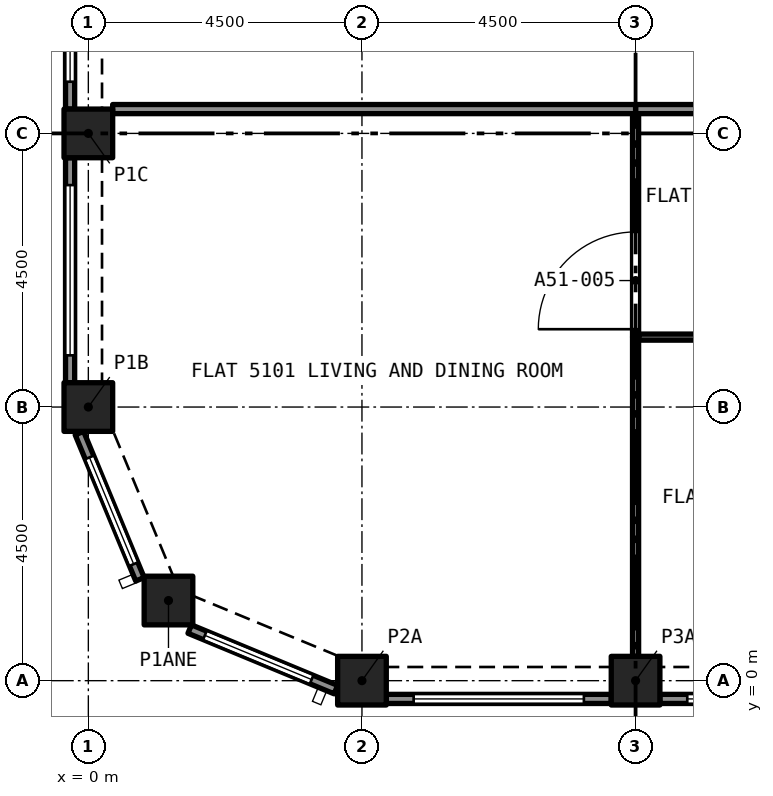
"""IFC4 building model, lengths in metres.
Left out: names, types, materials, properties, quantities, classifications, styles, units other than length and angle.
Written with IfcOpenShell. Run it as: python <this file> out.ifc"""

import sys

from ifc_helpers import new_model, si_unit, direction, frame, frame_2d, origin, origin_2d, place, context, subcontext, project, spatial, rectangle, extrude, element, fill, save


model = new_model("IFC4")
c1 = context("Model", 3, precision=1e-05, world=origin(), true_north=direction((0.0, 1.0)))
c2 = subcontext(c1, "Body", "Model", "MODEL_VIEW")
j1 = project(units=[si_unit("LENGTHUNIT", "METRE"), si_unit("PLANEANGLEUNIT", "RADIAN")], contexts=[c1])
p1 = place(None, origin())
s1 = spatial("IfcSite", under=j1, at=p1, CompositionType="ELEMENT")
p2 = place(p1, origin())
s2 = spatial("IfcBuilding", under=s1, at=p2, CompositionType="ELEMENT")
p3 = place(p2, frame((0.0, 0.0, 185.9)))
s3 = spatial("IfcBuildingStorey", under=s2, at=p3, CompositionType="ELEMENT", Elevation=185.9)
for number, where, z_axis, x_axis in (
    (1, (4.5, 0.0, 0.0), (0.0, 0.0, 1.0), (1.0, 0.0, 0.0)),
    (2, (9.0, 0.0, 0.0), (0.0, 0.0, 1.0), (1.0, 0.0, 0.0)),
    (3, (1.318, 1.318, 0.0), (0.0, 0.0, 1.0), (1.0, 0.0, 0.0)),
    (4, (0.0, 4.5, 0.0), (0.0, 0.0, 1.0), (1.0, 0.0, 0.0)),
    (5, (0.0, 9.0, 0.0), (0.0, 0.0, 1.0), (1.0, 0.0, 0.0)),
):
    element("IfcColumn", number, at=place(p3, frame(where, z_axis=z_axis, x_axis=x_axis)), inside=s3, PredefinedType="COLUMN", context=c2, shape_type="SweptSolid", body=[
        extrude(rectangle(XDim=0.8, YDim=0.8, at=origin_2d()), origin(), (0.0, 0.0, 1.0), 3.2),
    ])
p4 = place(p3, frame((-0.3, 9.4, 0.0), z_axis=(0.0, 0.0, 1.0), x_axis=(0.0, 1.0, 0.0)))
e6 = element("IfcWall", 6, at=p4, inside=s3, PredefinedType="SOLIDWALL", context=c2, shape_type="SweptSolid", body=[
    extrude(rectangle(XDim=3.7, YDim=0.15, at=frame_2d((1.85, 0.0))), origin(), (0.0, 0.0, 1.0), 3.2),
])
p5 = place(p4, frame((0.45, 0.0, 0.45)))
e7 = element("IfcOpeningElement", 7, at=p5, cuts=e6, PredefinedType="OPENING", context=c2, shape_type="SweptSolid", body=[
    extrude(rectangle(XDim=2.8, YDim=1.95, at=frame_2d((1.4, 0.975))), frame((0.0, 0.085, 0.0), z_axis=(0.0, -1.0, 0.0), x_axis=(1.0, 0.0, 0.0)), (0.0, 0.0, 1.0), 0.17),
])
p6 = place(p3, frame((-0.3, 4.9, 0.0), z_axis=(0.0, 0.0, 1.0), x_axis=(0.0, 1.0, 0.0)))
e8 = element("IfcWall", 8, at=p6, inside=s3, PredefinedType="SOLIDWALL", context=c2, shape_type="SweptSolid", body=[
    extrude(rectangle(XDim=3.7, YDim=0.15, at=frame_2d((1.85, 0.0))), origin(), (0.0, 0.0, 1.0), 3.2),
])
p7 = place(p6, frame((0.45, 0.0, 0.45)))
e9 = element("IfcOpeningElement", 9, at=p7, cuts=e8, PredefinedType="OPENING", context=c2, shape_type="SweptSolid", body=[
    extrude(rectangle(XDim=2.8, YDim=1.95, at=frame_2d((1.4, 0.975))), frame((0.0, 0.085, 0.0), z_axis=(0.0, -1.0, 0.0), x_axis=(1.0, 0.0, 0.0)), (0.0, 0.0, 1.0), 0.17),
])
p8 = place(p3, frame((0.849, 1.667, 0.0), z_axis=(0.0, 0.0, 1.0), x_axis=(-0.382669406082, 0.923885342263, 0.0)))
e10 = element("IfcWall", 10, at=p8, inside=s3, PredefinedType="SOLIDWALL", context=c2, shape_type="SweptSolid", body=[
    extrude(rectangle(XDim=2.602, YDim=0.15, at=frame_2d((1.301, 0.0))), origin(), (0.0, 0.0, 1.0), 3.2),
])
p9 = place(p8, frame((0.27, 0.0, 0.45)))
e11 = element("IfcOpeningElement", 11, at=p9, cuts=e10, PredefinedType="OPENING", context=c2, shape_type="SweptSolid", body=[
    extrude(rectangle(XDim=1.9, YDim=1.95, at=frame_2d((0.95, 0.975))), frame((0.0, 0.085, 0.0), z_axis=(0.0, -1.0, 0.0), x_axis=(1.0, 0.0, 0.0)), (0.0, 0.0, 1.0), 0.17),
])
p10 = place(p3, frame((4.071, -0.147, 0.0), z_axis=(0.0, 0.0, 1.0), x_axis=(-0.923885342263, 0.382669406082, 0.0)))
e12 = element("IfcWall", 12, at=p10, inside=s3, PredefinedType="SOLIDWALL", context=c2, shape_type="SweptSolid", body=[
    extrude(rectangle(XDim=2.602, YDim=0.15, at=frame_2d((1.301, 0.0))), origin(), (0.0, 0.0, 1.0), 3.2),
])
p11 = place(p10, frame((0.432, 0.0, 0.45)))
e13 = element("IfcOpeningElement", 13, at=p11, cuts=e12, PredefinedType="OPENING", context=c2, shape_type="SweptSolid", body=[
    extrude(rectangle(XDim=1.9, YDim=1.95, at=frame_2d((0.95, 0.975))), frame((0.0, 0.085, 0.0), z_axis=(0.0, -1.0, 0.0), x_axis=(1.0, 0.0, 0.0)), (0.0, 0.0, 1.0), 0.17),
])
p12 = place(p3, frame((8.6, -0.3, 0.0), z_axis=(0.0, 0.0, 1.0), x_axis=(-1.0, 0.0, 0.0)))
e14 = element("IfcWall", 14, at=p12, inside=s3, PredefinedType="SOLIDWALL", context=c2, shape_type="SweptSolid", body=[
    extrude(rectangle(XDim=3.7, YDim=0.15, at=frame_2d((1.85, 0.0))), origin(), (0.0, 0.0, 1.0), 3.2),
])
p13 = place(p12, frame((0.45, 0.0, 0.45)))
e15 = element("IfcOpeningElement", 15, at=p13, cuts=e14, PredefinedType="OPENING", context=c2, shape_type="SweptSolid", body=[
    extrude(rectangle(XDim=2.8, YDim=1.95, at=frame_2d((1.4, 0.975))), frame((0.0, 0.085, 0.0), z_axis=(0.0, -1.0, 0.0), x_axis=(1.0, 0.0, 0.0)), (0.0, 0.0, 1.0), 0.17),
])
p14 = place(p3, frame((13.1, -0.3, 0.0), z_axis=(0.0, 0.0, 1.0), x_axis=(-1.0, 0.0, 0.0)))
e16 = element("IfcWall", 16, at=p14, inside=s3, PredefinedType="SOLIDWALL", context=c2, shape_type="SweptSolid", body=[
    extrude(rectangle(XDim=3.7, YDim=0.15, at=frame_2d((1.85, 0.0))), origin(), (0.0, 0.0, 1.0), 3.2),
])
p15 = place(p14, frame((0.45, 0.0, 0.45)))
e17 = element("IfcOpeningElement", 17, at=p15, cuts=e16, PredefinedType="OPENING", context=c2, shape_type="SweptSolid", body=[
    extrude(rectangle(XDim=2.8, YDim=1.95, at=frame_2d((1.4, 0.975))), frame((0.0, 0.085, 0.0), z_axis=(0.0, -1.0, 0.0), x_axis=(1.0, 0.0, 0.0)), (0.0, 0.0, 1.0), 0.17),
])
p16 = place(p3, frame((13.5, 5.65, 0.0), z_axis=(0.0, 0.0, 1.0), x_axis=(-1.0, 0.0, 0.0)))
e18 = element("IfcWall", 18, at=p16, inside=s3, PredefinedType="PARTITIONING", context=c2, shape_type="SweptSolid", body=[
    extrude(rectangle(XDim=4.45, YDim=0.1, at=frame_2d((2.225, 0.0))), origin(), (0.0, 0.0, 1.0), 2.9),
])
p17 = place(p16, frame((1.8, 0.0, 0.0)))
e19 = element("IfcOpeningElement", 19, at=p17, cuts=e18, PredefinedType="OPENING", context=c2, shape_type="SweptSolid", body=[
    extrude(rectangle(XDim=0.9, YDim=2.1, at=frame_2d((0.45, 1.05))), frame((0.0, 0.06, 0.0), z_axis=(0.0, -1.0, 0.0), x_axis=(1.0, 0.0, 0.0)), (0.0, 0.0, 1.0), 0.12),
])
p18 = place(p3, frame((9.0, 0.4, 0.0), z_axis=(0.0, 0.0, 1.0), x_axis=(0.0, 1.0, 0.0)))
e20 = element("IfcWall", 20, at=p18, inside=s3, PredefinedType="PARTITIONING", context=c2, shape_type="SweptSolid", body=[
    extrude(rectangle(XDim=5.25, YDim=0.1, at=frame_2d((2.625, 0.0))), origin(), (0.0, 0.0, 1.0), 2.9),
])
p19 = place(p3, frame((9.0, 5.65, 0.0), z_axis=(0.0, 0.0, 1.0), x_axis=(0.0, 1.0, 0.0)))
e21 = element("IfcWall", 21, at=p19, inside=s3, PredefinedType="PARTITIONING", context=c2, shape_type="SweptSolid", body=[
    extrude(rectangle(XDim=3.675, YDim=0.1, at=frame_2d((1.837, 0.0))), origin(), (0.0, 0.0, 1.0), 2.9),
])
p20 = place(p19, frame((0.13, 0.0, 0.0)))
e22 = element("IfcOpeningElement", 22, at=p20, cuts=e21, PredefinedType="OPENING", context=c2, shape_type="SweptSolid", body=[
    extrude(rectangle(XDim=1.6, YDim=2.1, at=frame_2d((0.8, 1.05))), frame((0.0, 0.06, 0.0), z_axis=(0.0, -1.0, 0.0), x_axis=(1.0, 0.0, 0.0)), (0.0, 0.0, 1.0), 0.12),
])
p21 = place(p3, frame((12.05, 9.4, 0.0), z_axis=(0.0, 0.0, 1.0), x_axis=(-1.0, 0.0, 0.0)))
e23 = element("IfcWall", 23, at=p21, inside=s3, PredefinedType="PARTITIONING", context=c2, shape_type="SweptSolid", body=[
    extrude(rectangle(XDim=3.05, YDim=0.15, at=frame_2d((1.525, 0.0))), origin(), (0.0, 0.0, 1.0), 2.9),
])
p22 = place(p21, frame((0.2, 0.0, 0.0)))
e24 = element("IfcOpeningElement", 24, at=p22, cuts=e23, PredefinedType="OPENING", context=c2, shape_type="SweptSolid", body=[
    extrude(rectangle(XDim=1.2, YDim=2.4, at=frame_2d((0.6, 1.2))), frame((0.0, 0.085, 0.0), z_axis=(0.0, -1.0, 0.0), x_axis=(1.0, 0.0, 0.0)), (0.0, 0.0, 1.0), 0.17),
])
p23 = place(p3, frame((0.4, 9.4, 0.0), z_axis=(0.0, 0.0, 1.0), x_axis=(1.0, 0.0, 0.0)))
e25 = element("IfcWall", 25, at=p23, inside=s3, PredefinedType="PARTITIONING", context=c2, shape_type="SweptSolid", body=[
    extrude(rectangle(XDim=8.6, YDim=0.15, at=frame_2d((4.3, 0.0))), origin(), (0.0, 0.0, 1.0), 2.9),
])
p24 = place(p5, origin())
e26 = element("IfcWindow", 26, at=p24, inside=s3, PartitioningType="SINGLE_PANEL", PredefinedType="WINDOW", context=c2, shape_type="SweptSolid", body=[
    extrude(rectangle(XDim=2.8, YDim=1.95, at=frame_2d((1.4, 0.975))), frame((0.0, 0.03, 0.0), z_axis=(0.0, -1.0, 0.0), x_axis=(1.0, 0.0, 0.0)), (0.0, 0.0, 1.0), 0.06),
])
fill(e7, e26)
p25 = place(p7, origin())
e27 = element("IfcWindow", 27, at=p25, inside=s3, PartitioningType="SINGLE_PANEL", PredefinedType="WINDOW", context=c2, shape_type="SweptSolid", body=[
    extrude(rectangle(XDim=2.8, YDim=1.95, at=frame_2d((1.4, 0.975))), frame((0.0, 0.03, 0.0), z_axis=(0.0, -1.0, 0.0), x_axis=(1.0, 0.0, 0.0)), (0.0, 0.0, 1.0), 0.06),
])
fill(e9, e27)
p26 = place(p9, origin())
e28 = element("IfcWindow", 28, at=p26, inside=s3, PartitioningType="SINGLE_PANEL", PredefinedType="WINDOW", context=c2, shape_type="SweptSolid", body=[
    extrude(rectangle(XDim=1.9, YDim=1.95, at=frame_2d((0.95, 0.975))), frame((0.0, 0.03, 0.0), z_axis=(0.0, -1.0, 0.0), x_axis=(1.0, 0.0, 0.0)), (0.0, 0.0, 1.0), 0.06),
])
fill(e11, e28)
p27 = place(p11, origin())
e29 = element("IfcWindow", 29, at=p27, inside=s3, PartitioningType="SINGLE_PANEL", PredefinedType="WINDOW", context=c2, shape_type="SweptSolid", body=[
    extrude(rectangle(XDim=1.9, YDim=1.95, at=frame_2d((0.95, 0.975))), frame((0.0, 0.03, 0.0), z_axis=(0.0, -1.0, 0.0), x_axis=(1.0, 0.0, 0.0)), (0.0, 0.0, 1.0), 0.06),
])
fill(e13, e29)
p28 = place(p13, origin())
e30 = element("IfcWindow", 30, at=p28, inside=s3, PartitioningType="SINGLE_PANEL", PredefinedType="WINDOW", context=c2, shape_type="SweptSolid", body=[
    extrude(rectangle(XDim=2.8, YDim=1.95, at=frame_2d((1.4, 0.975))), frame((0.0, 0.03, 0.0), z_axis=(0.0, -1.0, 0.0), x_axis=(1.0, 0.0, 0.0)), (0.0, 0.0, 1.0), 0.06),
])
fill(e15, e30)
p29 = place(p15, origin())
e31 = element("IfcWindow", 31, at=p29, inside=s3, PartitioningType="SINGLE_PANEL", PredefinedType="WINDOW", context=c2, shape_type="SweptSolid", body=[
    extrude(rectangle(XDim=2.8, YDim=1.95, at=frame_2d((1.4, 0.975))), frame((0.0, 0.03, 0.0), z_axis=(0.0, -1.0, 0.0), x_axis=(1.0, 0.0, 0.0)), (0.0, 0.0, 1.0), 0.06),
])
fill(e17, e31)
p30 = place(p20, origin())
e32 = element("IfcDoor", 32, at=p30, inside=s3, OperationType="SINGLE_SWING_LEFT", PredefinedType="DOOR", context=c2, shape_type="SweptSolid", body=[
    extrude(rectangle(XDim=1.6, YDim=2.1, at=frame_2d((0.8, 1.05))), frame((0.0, 0.025, 0.0), z_axis=(0.0, -1.0, 0.0), x_axis=(1.0, 0.0, 0.0)), (0.0, 0.0, 1.0), 0.05),
])
fill(e22, e32)
save(model, sys.argv[1])
